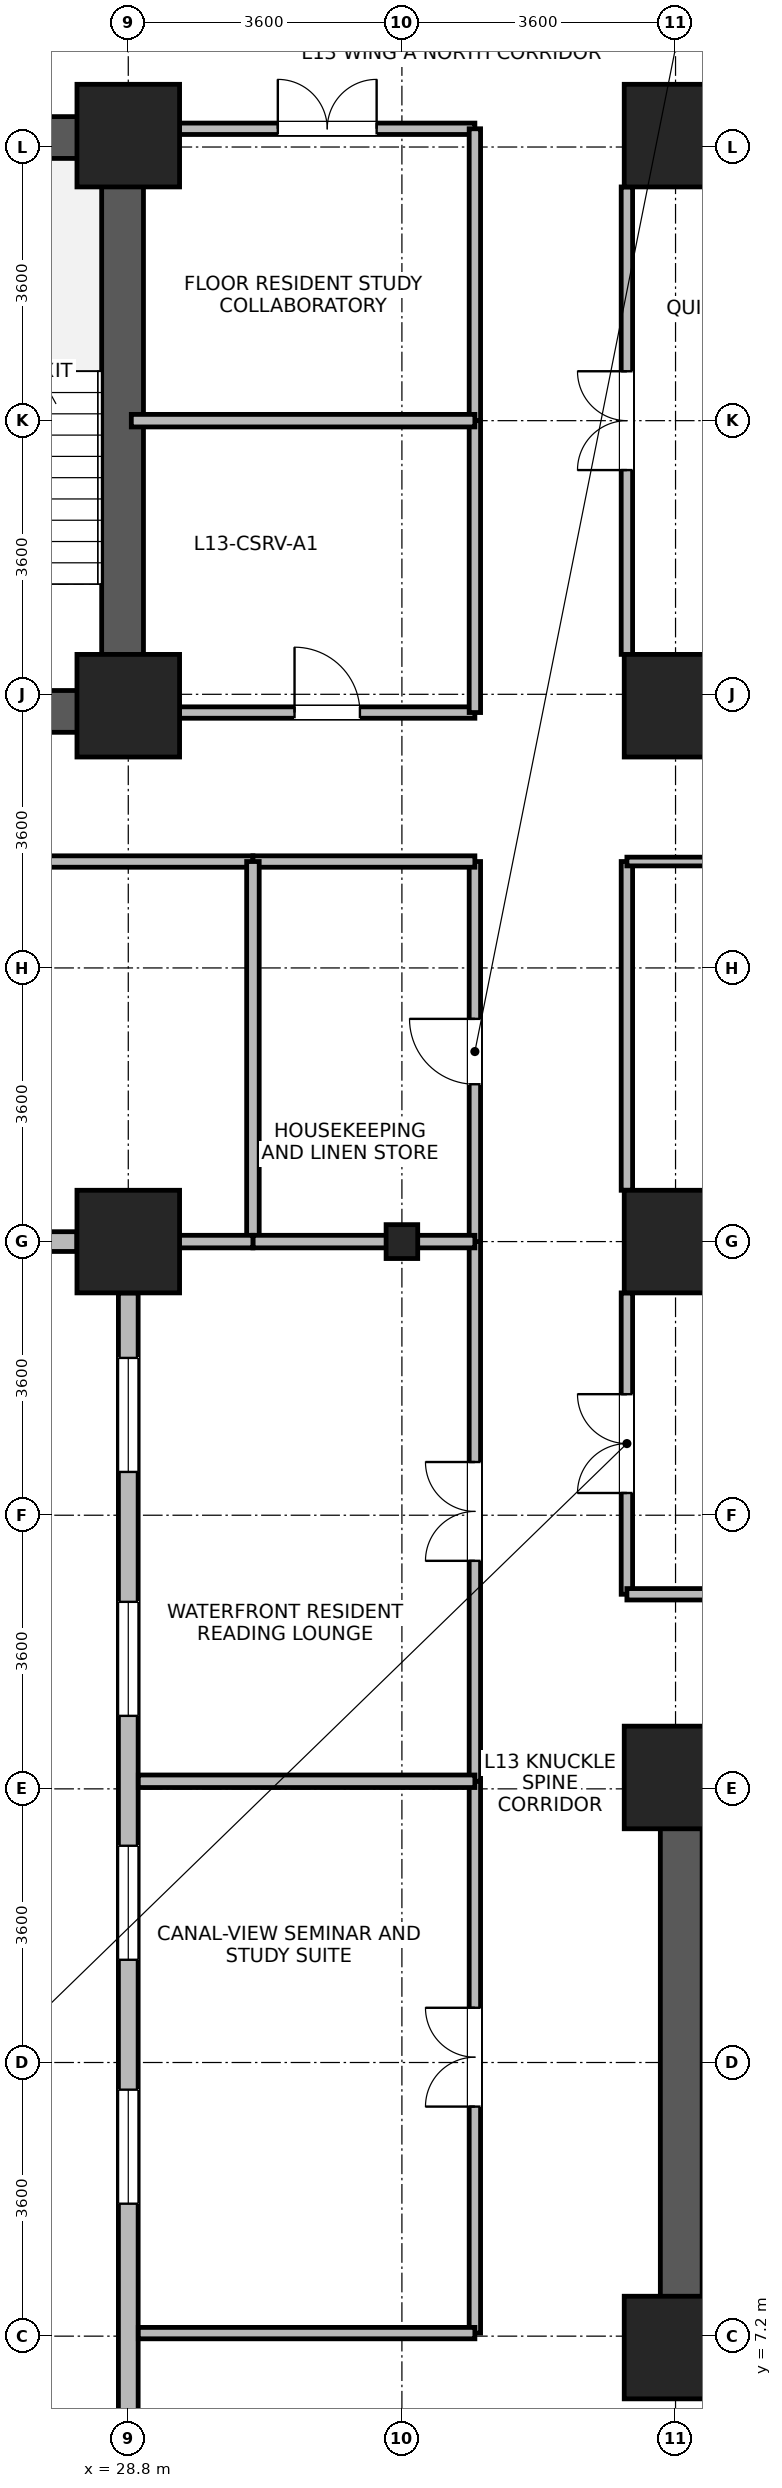
"""IFC4 building model, lengths in metres.
Left out: names, types, materials, properties, quantities, classifications, styles, units other than length and angle.
Written with IfcOpenShell. Run it as: python <this file> out.ifc"""

import sys

from ifc_helpers import new_model, si_unit, direction, frame, frame_2d, origin, origin_2d, place, context, subcontext, project, spatial, rectangle, i_section, extrude, source, transform, mapped, element, fill, save


model = new_model("IFC4")
c1 = context("Model", 3, precision=1e-05, world=origin(), true_north=direction((0.0, 1.0)))
c2 = subcontext(c1, "Body", "Model", "MODEL_VIEW")
j1 = project(units=[si_unit("LENGTHUNIT", "METRE"), si_unit("PLANEANGLEUNIT", "RADIAN")], contexts=[c1])
p1 = place(None, origin())
s1 = spatial("IfcSite", under=j1, at=p1, CompositionType="ELEMENT")
p2 = place(p1, origin())
s2 = spatial("IfcBuilding", under=s1, at=p2, CompositionType="ELEMENT")
p3 = place(p2, frame((0.0, 0.0, 54.9)))
s3 = spatial("IfcBuildingStorey", under=s2, at=p3, CompositionType="ELEMENT", Elevation=54.9)
p4 = place(p3, frame((28.725, 28.3, 0.0), z_axis=(0.0, 0.0, 1.0), x_axis=(0.0, 1.0, 0.0)))
e1 = element("IfcWall", 1, at=p4, inside=s3, PredefinedType="SHEAR", context=c2, shape_type="SweptSolid", body=[
    extrude(rectangle(XDim=8.1, YDim=0.55, at=frame_2d((4.05, 0.0))), origin(), (0.0, 0.0, 1.0), 3.45),
])
for number, where, z_axis, x_axis in (
    (2, (25.25, 28.575, 0.0), (0.0, 0.0, 1.0), (1.0, 0.0, 0.0)),
    (3, (25.25, 36.125, 0.0), (0.0, 0.0, 1.0), (1.0, 0.0, 0.0)),
):
    element("IfcWall", number, at=place(p3, frame(where, z_axis=z_axis, x_axis=x_axis)), inside=s3, PredefinedType="SHEAR", context=c2, shape_type="SweptSolid", body=[
        extrude(rectangle(XDim=3.2, YDim=0.55, at=frame_2d((1.6, 0.0))), origin(), (0.0, 0.0, 1.0), 3.45),
    ])
p5 = place(p3, frame((36.075, 6.75, 0.0), z_axis=(0.0, 0.0, 1.0), x_axis=(0.0, 1.0, 0.0)))
e4 = element("IfcWall", 4, at=p5, inside=s3, PredefinedType="SHEAR", context=c2, shape_type="SweptSolid", body=[
    extrude(rectangle(XDim=8.1, YDim=0.55, at=frame_2d((4.05, 0.0))), origin(), (0.0, 0.0, 1.0), 3.45),
])
m1 = source(origin(), c2, "Body", "SweptSolid", [
    extrude(rectangle(XDim=1.35, YDim=1.35, at=origin_2d()), origin(), (0.0, 0.0, 1.0), 3.7),
])
for number, where, z_axis, x_axis in (
    (5, (28.8, 21.6, 0.0), (0.0, 0.0, 1.0), (1.0, 0.0, 0.0)),
    (6, (28.8, 28.65, 0.0), (0.0, 0.0, 1.0), (1.0, 0.0, 0.0)),
    (7, (28.8, 36.15, 0.0), (0.0, 0.0, 1.0), (1.0, 0.0, 0.0)),
    (8, (36.0, 21.6, 0.0), (0.0, 0.0, 1.0), (1.0, 0.0, 0.0)),
    (9, (36.0, 28.65, 0.0), (0.0, 0.0, 1.0), (1.0, 0.0, 0.0)),
    (10, (36.0, 36.15, 0.0), (0.0, 0.0, 1.0), (1.0, 0.0, 0.0)),
    (11, (36.0, 7.05, 0.0), (0.0, 0.0, 1.0), (1.0, 0.0, 0.0)),
    (12, (36.0, 14.55, 0.0), (0.0, 0.0, 1.0), (1.0, 0.0, 0.0)),
):
    element("IfcColumn", number, at=place(p3, frame(where, z_axis=z_axis, x_axis=x_axis)), inside=s3, PredefinedType="COLUMN", context=c2, shape_type="MappedRepresentation", body=[
        mapped(m1, transform((0.0, 0.0, 0.0), x_axis=(1.0, 0.0, 0.0), y_axis=(0.0, 1.0, 0.0), z_axis=(0.0, 0.0, 1.0), scale=1.0)),
    ])
m2 = source(origin(), c2, "Body", "SweptSolid", [
    extrude(i_section(OverallWidth=0.416, OverallDepth=0.446, WebThickness=0.029, FlangeThickness=0.04, FilletRadius=0.015, at=origin_2d()), origin(), (0.0, 0.0, 1.0), 3.7),
])
p6 = place(p3, frame((32.4, 21.6, 0.0), z_axis=(0.0, 0.0, 1.0), x_axis=(1.0, 0.0, 0.0)))
e13 = element("IfcColumn", 13, at=p6, inside=s3, PredefinedType="COLUMN", context=c2, shape_type="MappedRepresentation", body=[
    mapped(m2, transform((0.0, 0.0, 0.0), x_axis=(1.0, 0.0, 0.0), y_axis=(0.0, 1.0, 0.0), z_axis=(0.0, 0.0, 1.0), scale=1.0)),
])
p7 = place(p3, frame((28.124, 21.6, 0.0), z_axis=(0.0, 0.0, 1.0), x_axis=(-1.0, 0.0, 0.0)))
e14 = element("IfcWall", 14, at=p7, inside=s3, PredefinedType="STANDARD", context=c2, shape_type="SweptSolid", body=[
    extrude(rectangle(XDim=2.715, YDim=0.26, at=frame_2d((1.357, 0.0))), origin(), (0.0, 0.0, 1.0), 2.93),
])
p8 = place(p7, frame((0.883, 0.0, 0.85)))
e15 = element("IfcOpeningElement", 15, at=p8, cuts=e14, PredefinedType="OPENING", context=c2, shape_type="SweptSolid", body=[
    extrude(rectangle(XDim=0.95, YDim=1.75, at=frame_2d((0.475, 0.875))), frame((0.0, 0.14, 0.0), z_axis=(0.0, -1.0, 0.0), x_axis=(1.0, 0.0, 0.0)), (0.0, 0.0, 1.0), 0.28),
])
p9 = place(p3, frame((28.8, 1.67, 0.0), z_axis=(0.0, 0.0, 1.0), x_axis=(0.0, 1.0, 0.0)))
e16 = element("IfcWall", 16, at=p9, inside=s3, PredefinedType="STANDARD", context=c2, shape_type="SweptSolid", body=[
    extrude(rectangle(XDim=19.254, YDim=0.26, at=frame_2d((9.627, 0.0))), origin(), (0.0, 0.0, 1.0), 3.43),
])
p10 = place(p9, frame((0.854, 0.0, 0.85)))
e17 = element("IfcOpeningElement", 17, at=p10, cuts=e16, PredefinedType="OPENING", context=c2, shape_type="SweptSolid", body=[
    extrude(rectangle(XDim=1.5, YDim=1.85, at=frame_2d((0.75, 0.925))), frame((0.0, 0.14, 0.0), z_axis=(0.0, -1.0, 0.0), x_axis=(1.0, 0.0, 0.0)), (0.0, 0.0, 1.0), 0.28),
])
p11 = place(p9, frame((7.272, 0.0, 0.85)))
e18 = element("IfcOpeningElement", 18, at=p11, cuts=e16, PredefinedType="OPENING", context=c2, shape_type="SweptSolid", body=[
    extrude(rectangle(XDim=1.5, YDim=1.85, at=frame_2d((0.75, 0.925))), frame((0.0, 0.14, 0.0), z_axis=(0.0, -1.0, 0.0), x_axis=(1.0, 0.0, 0.0)), (0.0, 0.0, 1.0), 0.28),
])
p12 = place(p9, frame((10.481, 0.0, 0.85)))
e19 = element("IfcOpeningElement", 19, at=p12, cuts=e16, PredefinedType="OPENING", context=c2, shape_type="SweptSolid", body=[
    extrude(rectangle(XDim=1.5, YDim=1.85, at=frame_2d((0.75, 0.925))), frame((0.0, 0.14, 0.0), z_axis=(0.0, -1.0, 0.0), x_axis=(1.0, 0.0, 0.0)), (0.0, 0.0, 1.0), 0.28),
])
p13 = place(p9, frame((13.69, 0.0, 0.85)))
e20 = element("IfcOpeningElement", 20, at=p13, cuts=e16, PredefinedType="OPENING", context=c2, shape_type="SweptSolid", body=[
    extrude(rectangle(XDim=1.5, YDim=1.85, at=frame_2d((0.75, 0.925))), frame((0.0, 0.14, 0.0), z_axis=(0.0, -1.0, 0.0), x_axis=(1.0, 0.0, 0.0)), (0.0, 0.0, 1.0), 0.28),
])
p14 = place(p9, frame((16.899, 0.0, 0.85)))
e21 = element("IfcOpeningElement", 21, at=p14, cuts=e16, PredefinedType="OPENING", context=c2, shape_type="SweptSolid", body=[
    extrude(rectangle(XDim=1.5, YDim=1.85, at=frame_2d((0.75, 0.925))), frame((0.0, 0.14, 0.0), z_axis=(0.0, -1.0, 0.0), x_axis=(1.0, 0.0, 0.0)), (0.0, 0.0, 1.0), 0.28),
])
p15 = place(p3, frame((18.04, 26.6, 0.0), z_axis=(0.0, 0.0, 1.0), x_axis=(1.0, 0.0, 0.0)))
e22 = element("IfcWall", 22, at=p15, inside=s3, PredefinedType="PARTITIONING", context=c2, shape_type="SweptSolid", body=[
    extrude(rectangle(XDim=12.4, YDim=0.15, at=frame_2d((6.2, 0.0))), origin(), (0.0, 0.0, 1.0), 3.43),
])
p16 = place(p15, frame((5.55, 0.0, 0.0)))
e23 = element("IfcOpeningElement", 23, at=p16, cuts=e22, PredefinedType="OPENING", context=c2, shape_type="SweptSolid", body=[
    extrude(rectangle(XDim=1.3, YDim=2.12, at=frame_2d((0.65, 1.06))), frame((0.0, 0.085, 0.0), z_axis=(0.0, -1.0, 0.0), x_axis=(1.0, 0.0, 0.0)), (0.0, 0.0, 1.0), 0.17),
])
p17 = place(p3, frame((35.36, 16.96, 0.0), z_axis=(0.0, 0.0, 1.0), x_axis=(0.0, 1.0, 0.0)))
e24 = element("IfcWall", 24, at=p17, inside=s3, PredefinedType="PARTITIONING", context=c2, shape_type="SweptSolid", body=[
    extrude(rectangle(XDim=3.965, YDim=0.15, at=frame_2d((1.982, 0.0))), origin(), (0.0, 0.0, 1.0), 3.43),
])
p18 = place(p17, frame((1.333, 0.0, 0.0)))
e25 = element("IfcOpeningElement", 25, at=p18, cuts=e24, PredefinedType="OPENING", context=c2, shape_type="SweptSolid", body=[
    extrude(rectangle(XDim=1.3, YDim=2.12, at=frame_2d((0.65, 1.06))), frame((0.0, 0.085, 0.0), z_axis=(0.0, -1.0, 0.0), x_axis=(1.0, 0.0, 0.0)), (0.0, 0.0, 1.0), 0.17),
])
p19 = place(p3, frame((35.36, 22.275, 0.0), z_axis=(0.0, 0.0, 1.0), x_axis=(0.0, 1.0, 0.0)))
e26 = element("IfcWall", 26, at=p19, inside=s3, PredefinedType="PARTITIONING", context=c2, shape_type="SweptSolid", body=[
    extrude(rectangle(XDim=4.325, YDim=0.15, at=frame_2d((2.163, 0.0))), origin(), (0.0, 0.0, 1.0), 3.43),
])
p20 = place(p3, frame((35.36, 29.325, 0.0), z_axis=(0.0, 0.0, 1.0), x_axis=(0.0, 1.0, 0.0)))
e27 = element("IfcWall", 27, at=p20, inside=s3, PredefinedType="PARTITIONING", context=c2, shape_type="SweptSolid", body=[
    extrude(rectangle(XDim=6.15, YDim=0.15, at=frame_2d((3.075, 0.0))), origin(), (0.0, 0.0, 1.0), 3.43),
])
p21 = place(p20, frame((2.425, 0.0, 0.0)))
e28 = element("IfcOpeningElement", 28, at=p21, cuts=e27, PredefinedType="OPENING", context=c2, shape_type="SweptSolid", body=[
    extrude(rectangle(XDim=1.3, YDim=2.12, at=frame_2d((0.65, 1.06))), frame((0.0, 0.085, 0.0), z_axis=(0.0, -1.0, 0.0), x_axis=(1.0, 0.0, 0.0)), (0.0, 0.0, 1.0), 0.17),
])
p22 = place(p3, frame((35.36, 16.96, 0.0), z_axis=(0.0, 0.0, 1.0), x_axis=(1.0, 0.0, 0.0)))
e29 = element("IfcWall", 29, at=p22, inside=s3, PredefinedType="PARTITIONING", context=c2, shape_type="SweptSolid", body=[
    extrude(rectangle(XDim=7.42, YDim=0.15, at=frame_2d((3.71, 0.0))), origin(), (0.0, 0.0, 1.0), 3.43),
])
p23 = place(p3, frame((33.36, 7.24, 0.0), z_axis=(0.0, 0.0, 1.0), x_axis=(0.0, 1.0, 0.0)))
e30 = element("IfcWall", 30, at=p23, inside=s3, PredefinedType="PARTITIONING", context=c2, shape_type="SweptSolid", body=[
    extrude(rectangle(XDim=7.26, YDim=0.15, at=frame_2d((3.63, 0.0))), origin(), (0.0, 0.0, 1.0), 3.43),
])
p24 = place(p23, frame((2.98, 0.0, 0.0)))
e31 = element("IfcOpeningElement", 31, at=p24, cuts=e30, PredefinedType="OPENING", context=c2, shape_type="SweptSolid", body=[
    extrude(rectangle(XDim=1.3, YDim=2.12, at=frame_2d((0.65, 1.06))), frame((0.0, 0.085, 0.0), z_axis=(0.0, -1.0, 0.0), x_axis=(1.0, 0.0, 0.0)), (0.0, 0.0, 1.0), 0.17),
])
p25 = place(p3, frame((33.36, 14.5, 0.0), z_axis=(0.0, 0.0, 1.0), x_axis=(0.0, 1.0, 0.0)))
e32 = element("IfcWall", 32, at=p25, inside=s3, PredefinedType="PARTITIONING", context=c2, shape_type="SweptSolid", body=[
    extrude(rectangle(XDim=7.1, YDim=0.15, at=frame_2d((3.55, 0.0))), origin(), (0.0, 0.0, 1.0), 3.43),
])
p26 = place(p25, frame((2.9, 0.0, 0.0)))
e33 = element("IfcOpeningElement", 33, at=p26, cuts=e32, PredefinedType="OPENING", context=c2, shape_type="SweptSolid", body=[
    extrude(rectangle(XDim=1.3, YDim=2.12, at=frame_2d((0.65, 1.06))), frame((0.0, 0.085, 0.0), z_axis=(0.0, -1.0, 0.0), x_axis=(1.0, 0.0, 0.0)), (0.0, 0.0, 1.0), 0.17),
])
p27 = place(p3, frame((33.36, 21.6, 0.0), z_axis=(0.0, 0.0, 1.0), x_axis=(0.0, 1.0, 0.0)))
e34 = element("IfcWall", 34, at=p27, inside=s3, PredefinedType="PARTITIONING", context=c2, shape_type="SweptSolid", body=[
    extrude(rectangle(XDim=5.0, YDim=0.15, at=frame_2d((2.5, 0.0))), origin(), (0.0, 0.0, 1.0), 3.43),
])
p28 = place(p27, frame((2.07, 0.0, 0.0)))
e35 = element("IfcOpeningElement", 35, at=p28, cuts=e34, PredefinedType="OPENING", context=c2, shape_type="SweptSolid", body=[
    extrude(rectangle(XDim=0.86, YDim=2.02, at=frame_2d((0.43, 1.01))), frame((0.0, 0.085, 0.0), z_axis=(0.0, -1.0, 0.0), x_axis=(1.0, 0.0, 0.0)), (0.0, 0.0, 1.0), 0.17),
])
p29 = place(p3, frame((28.932, 7.24, 0.0), z_axis=(0.0, 0.0, 1.0), x_axis=(1.0, 0.0, 0.0)))
e36 = element("IfcWall", 36, at=p29, inside=s3, PredefinedType="PARTITIONING", context=c2, shape_type="SweptSolid", body=[
    extrude(rectangle(XDim=4.428, YDim=0.15, at=frame_2d((2.214, 0.0))), origin(), (0.0, 0.0, 1.0), 3.43),
])
p30 = place(p3, frame((29.475, 28.56, 0.0), z_axis=(0.0, 0.0, 1.0), x_axis=(1.0, 0.0, 0.0)))
e37 = element("IfcWall", 37, at=p30, inside=s3, PredefinedType="PARTITIONING", context=c2, shape_type="SweptSolid", body=[
    extrude(rectangle(XDim=3.885, YDim=0.15, at=frame_2d((1.942, 0.0))), origin(), (0.0, 0.0, 1.0), 2.78),
])
p31 = place(p30, frame((1.512, 0.0, 0.0)))
e38 = element("IfcOpeningElement", 38, at=p31, cuts=e37, PredefinedType="OPENING", context=c2, shape_type="SweptSolid", body=[
    extrude(rectangle(XDim=0.86, YDim=2.02, at=frame_2d((0.43, 1.01))), frame((0.0, 0.085, 0.0), z_axis=(0.0, -1.0, 0.0), x_axis=(1.0, 0.0, 0.0)), (0.0, 0.0, 1.0), 0.17),
])
p32 = place(p3, frame((29.475, 36.24, 0.0), z_axis=(0.0, 0.0, 1.0), x_axis=(1.0, 0.0, 0.0)))
e39 = element("IfcWall", 39, at=p32, inside=s3, PredefinedType="PARTITIONING", context=c2, shape_type="SweptSolid", body=[
    extrude(rectangle(XDim=3.885, YDim=0.15, at=frame_2d((1.942, 0.0))), origin(), (0.0, 0.0, 1.0), 2.78),
])
p33 = place(p32, frame((1.292, 0.0, 0.0)))
e40 = element("IfcOpeningElement", 40, at=p33, cuts=e39, PredefinedType="OPENING", context=c2, shape_type="SweptSolid", body=[
    extrude(rectangle(XDim=1.3, YDim=2.12, at=frame_2d((0.65, 1.06))), frame((0.0, 0.085, 0.0), z_axis=(0.0, -1.0, 0.0), x_axis=(1.0, 0.0, 0.0)), (0.0, 0.0, 1.0), 0.17),
])
p34 = place(p3, frame((33.36, 32.4, 0.0), z_axis=(0.0, 0.0, 1.0), x_axis=(0.0, 1.0, 0.0)))
e41 = element("IfcWall", 41, at=p34, inside=s3, PredefinedType="PARTITIONING", context=c2, shape_type="SweptSolid", body=[
    extrude(rectangle(XDim=3.84, YDim=0.15, at=frame_2d((1.92, 0.0))), origin(), (0.0, 0.0, 1.0), 3.43),
])
p35 = place(p3, frame((33.36, 28.56, 0.0), z_axis=(0.0, 0.0, 1.0), x_axis=(0.0, 1.0, 0.0)))
e42 = element("IfcWall", 42, at=p35, inside=s3, PredefinedType="PARTITIONING", context=c2, shape_type="SweptSolid", body=[
    extrude(rectangle(XDim=3.84, YDim=0.15, at=frame_2d((1.92, 0.0))), origin(), (0.0, 0.0, 1.0), 3.43),
])
p36 = place(p3, frame((30.44, 26.6, 0.0), z_axis=(0.0, 0.0, 1.0), x_axis=(1.0, 0.0, 0.0)))
e43 = element("IfcWall", 43, at=p36, inside=s3, PredefinedType="PARTITIONING", context=c2, shape_type="SweptSolid", body=[
    extrude(rectangle(XDim=2.92, YDim=0.15, at=frame_2d((1.46, 0.0))), origin(), (0.0, 0.0, 1.0), 3.43),
])
p37 = place(p3, frame((35.36, 26.6, 0.0), z_axis=(0.0, 0.0, 1.0), x_axis=(1.0, 0.0, 0.0)))
e44 = element("IfcWall", 44, at=p37, inside=s3, PredefinedType="PARTITIONING", context=c2, shape_type="SweptSolid", body=[
    extrude(rectangle(XDim=7.42, YDim=0.115, at=frame_2d((3.71, 0.0))), origin(), (0.0, 0.0, 1.0), 3.43),
])
p38 = place(p3, frame((30.44, 21.6, 0.0), z_axis=(0.0, 0.0, 1.0), x_axis=(0.0, 1.0, 0.0)))
e45 = element("IfcWall", 45, at=p38, inside=s3, PredefinedType="PARTITIONING", context=c2, shape_type="SweptSolid", body=[
    extrude(rectangle(XDim=5.0, YDim=0.165, at=frame_2d((2.5, 0.0))), origin(), (0.0, 0.0, 1.0), 3.43),
])
p39 = place(p3, frame((28.932, 14.5, 0.0), z_axis=(0.0, 0.0, 1.0), x_axis=(1.0, 0.0, 0.0)))
e46 = element("IfcWall", 46, at=p39, inside=s3, PredefinedType="PARTITIONING", context=c2, shape_type="SweptSolid", body=[
    extrude(rectangle(XDim=4.428, YDim=0.165, at=frame_2d((2.214, 0.0))), origin(), (0.0, 0.0, 1.0), 3.43),
])
p40 = place(p3, frame((28.84, 32.4, 0.0), z_axis=(0.0, 0.0, 1.0), x_axis=(1.0, 0.0, 0.0)))
e47 = element("IfcWall", 47, at=p40, inside=s3, PredefinedType="PARTITIONING", context=c2, shape_type="SweptSolid", body=[
    extrude(rectangle(XDim=4.52, YDim=0.165, at=frame_2d((2.26, 0.0))), origin(), (0.0, 0.0, 1.0), 3.43),
])
p41 = place(p3, frame((30.44, 21.6, 0.0), z_axis=(0.0, 0.0, 1.0), x_axis=(1.0, 0.0, 0.0)))
e48 = element("IfcWall", 48, at=p41, inside=s3, PredefinedType="PARTITIONING", context=c2, shape_type="SweptSolid", body=[
    extrude(rectangle(XDim=2.92, YDim=0.165, at=frame_2d((1.46, 0.0))), origin(), (0.0, 0.0, 1.0), 2.93),
])
p42 = place(p3, frame((28.932, 21.6, 0.0), z_axis=(0.0, 0.0, 1.0), x_axis=(1.0, 0.0, 0.0)))
e49 = element("IfcWall", 49, at=p42, inside=s3, PredefinedType="PARTITIONING", context=c2, shape_type="SweptSolid", body=[
    extrude(rectangle(XDim=1.508, YDim=0.165, at=frame_2d((0.754, 0.0))), origin(), (0.0, 0.0, 1.0), 2.93),
])
p43 = place(p11, origin())
e50 = element("IfcWindow", 50, at=p43, inside=s3, PartitioningType="SINGLE_PANEL", PredefinedType="WINDOW", context=c2, shape_type="SweptSolid", body=[
    extrude(rectangle(XDim=1.5, YDim=1.85, at=frame_2d((0.75, 0.925))), frame((0.0, 0.03, 0.0), z_axis=(0.0, -1.0, 0.0), x_axis=(1.0, 0.0, 0.0)), (0.0, 0.0, 1.0), 0.06),
])
fill(e18, e50)
p44 = place(p12, origin())
e51 = element("IfcWindow", 51, at=p44, inside=s3, PartitioningType="SINGLE_PANEL", PredefinedType="WINDOW", context=c2, shape_type="SweptSolid", body=[
    extrude(rectangle(XDim=1.5, YDim=1.85, at=frame_2d((0.75, 0.925))), frame((0.0, 0.03, 0.0), z_axis=(0.0, -1.0, 0.0), x_axis=(1.0, 0.0, 0.0)), (0.0, 0.0, 1.0), 0.06),
])
fill(e19, e51)
p45 = place(p13, origin())
e52 = element("IfcWindow", 52, at=p45, inside=s3, PartitioningType="SINGLE_PANEL", PredefinedType="WINDOW", context=c2, shape_type="SweptSolid", body=[
    extrude(rectangle(XDim=1.5, YDim=1.85, at=frame_2d((0.75, 0.925))), frame((0.0, 0.03, 0.0), z_axis=(0.0, -1.0, 0.0), x_axis=(1.0, 0.0, 0.0)), (0.0, 0.0, 1.0), 0.06),
])
fill(e20, e52)
p46 = place(p14, origin())
e53 = element("IfcWindow", 53, at=p46, inside=s3, PartitioningType="SINGLE_PANEL", PredefinedType="WINDOW", context=c2, shape_type="SweptSolid", body=[
    extrude(rectangle(XDim=1.5, YDim=1.85, at=frame_2d((0.75, 0.925))), frame((0.0, 0.03, 0.0), z_axis=(0.0, -1.0, 0.0), x_axis=(1.0, 0.0, 0.0)), (0.0, 0.0, 1.0), 0.06),
])
fill(e21, e53)
p47 = place(p18, origin())
e54 = element("IfcDoor", 54, at=p47, inside=s3, OperationType="DOUBLE_DOOR_SINGLE_SWING", PredefinedType="DOOR", context=c2, shape_type="SweptSolid", body=[
    extrude(rectangle(XDim=1.3, YDim=2.12, at=frame_2d((0.65, 1.06))), frame((0.0, 0.025, 0.0), z_axis=(0.0, -1.0, 0.0), x_axis=(1.0, 0.0, 0.0)), (0.0, 0.0, 1.0), 0.05),
])
fill(e25, e54)
p48 = place(p21, origin())
e55 = element("IfcDoor", 55, at=p48, inside=s3, OperationType="DOUBLE_DOOR_SINGLE_SWING", PredefinedType="DOOR", context=c2, shape_type="SweptSolid", body=[
    extrude(rectangle(XDim=1.3, YDim=2.12, at=frame_2d((0.65, 1.06))), frame((0.0, 0.025, 0.0), z_axis=(0.0, -1.0, 0.0), x_axis=(1.0, 0.0, 0.0)), (0.0, 0.0, 1.0), 0.05),
])
fill(e28, e55)
p49 = place(p24, origin())
e56 = element("IfcDoor", 56, at=p49, inside=s3, OperationType="DOUBLE_DOOR_SINGLE_SWING", PredefinedType="DOOR", context=c2, shape_type="SweptSolid", body=[
    extrude(rectangle(XDim=1.3, YDim=2.12, at=frame_2d((0.65, 1.06))), frame((0.0, 0.025, 0.0), z_axis=(0.0, -1.0, 0.0), x_axis=(1.0, 0.0, 0.0)), (0.0, 0.0, 1.0), 0.05),
])
fill(e31, e56)
p50 = place(p26, origin())
e57 = element("IfcDoor", 57, at=p50, inside=s3, OperationType="DOUBLE_DOOR_SINGLE_SWING", PredefinedType="DOOR", context=c2, shape_type="SweptSolid", body=[
    extrude(rectangle(XDim=1.3, YDim=2.12, at=frame_2d((0.65, 1.06))), frame((0.0, 0.025, 0.0), z_axis=(0.0, -1.0, 0.0), x_axis=(1.0, 0.0, 0.0)), (0.0, 0.0, 1.0), 0.05),
])
fill(e33, e57)
p51 = place(p28, origin())
e58 = element("IfcDoor", 58, at=p51, inside=s3, OperationType="SINGLE_SWING_RIGHT", PredefinedType="DOOR", context=c2, shape_type="SweptSolid", body=[
    extrude(rectangle(XDim=0.86, YDim=2.02, at=frame_2d((0.43, 1.01))), frame((0.0, 0.025, 0.0), z_axis=(0.0, -1.0, 0.0), x_axis=(1.0, 0.0, 0.0)), (0.0, 0.0, 1.0), 0.05),
])
fill(e35, e58)
p52 = place(p31, origin())
e59 = element("IfcDoor", 59, at=p52, inside=s3, OperationType="SINGLE_SWING_LEFT", PredefinedType="DOOR", context=c2, shape_type="SweptSolid", body=[
    extrude(rectangle(XDim=0.86, YDim=2.02, at=frame_2d((0.43, 1.01))), frame((0.0, 0.025, 0.0), z_axis=(0.0, -1.0, 0.0), x_axis=(1.0, 0.0, 0.0)), (0.0, 0.0, 1.0), 0.05),
])
fill(e38, e59)
p53 = place(p33, origin())
e60 = element("IfcDoor", 60, at=p53, inside=s3, OperationType="DOUBLE_DOOR_SINGLE_SWING", PredefinedType="DOOR", context=c2, shape_type="SweptSolid", body=[
    extrude(rectangle(XDim=1.3, YDim=2.12, at=frame_2d((0.65, 1.06))), frame((0.0, 0.025, 0.0), z_axis=(0.0, -1.0, 0.0), x_axis=(1.0, 0.0, 0.0)), (0.0, 0.0, 1.0), 0.05),
])
fill(e40, e60)
save(model, sys.argv[1])
